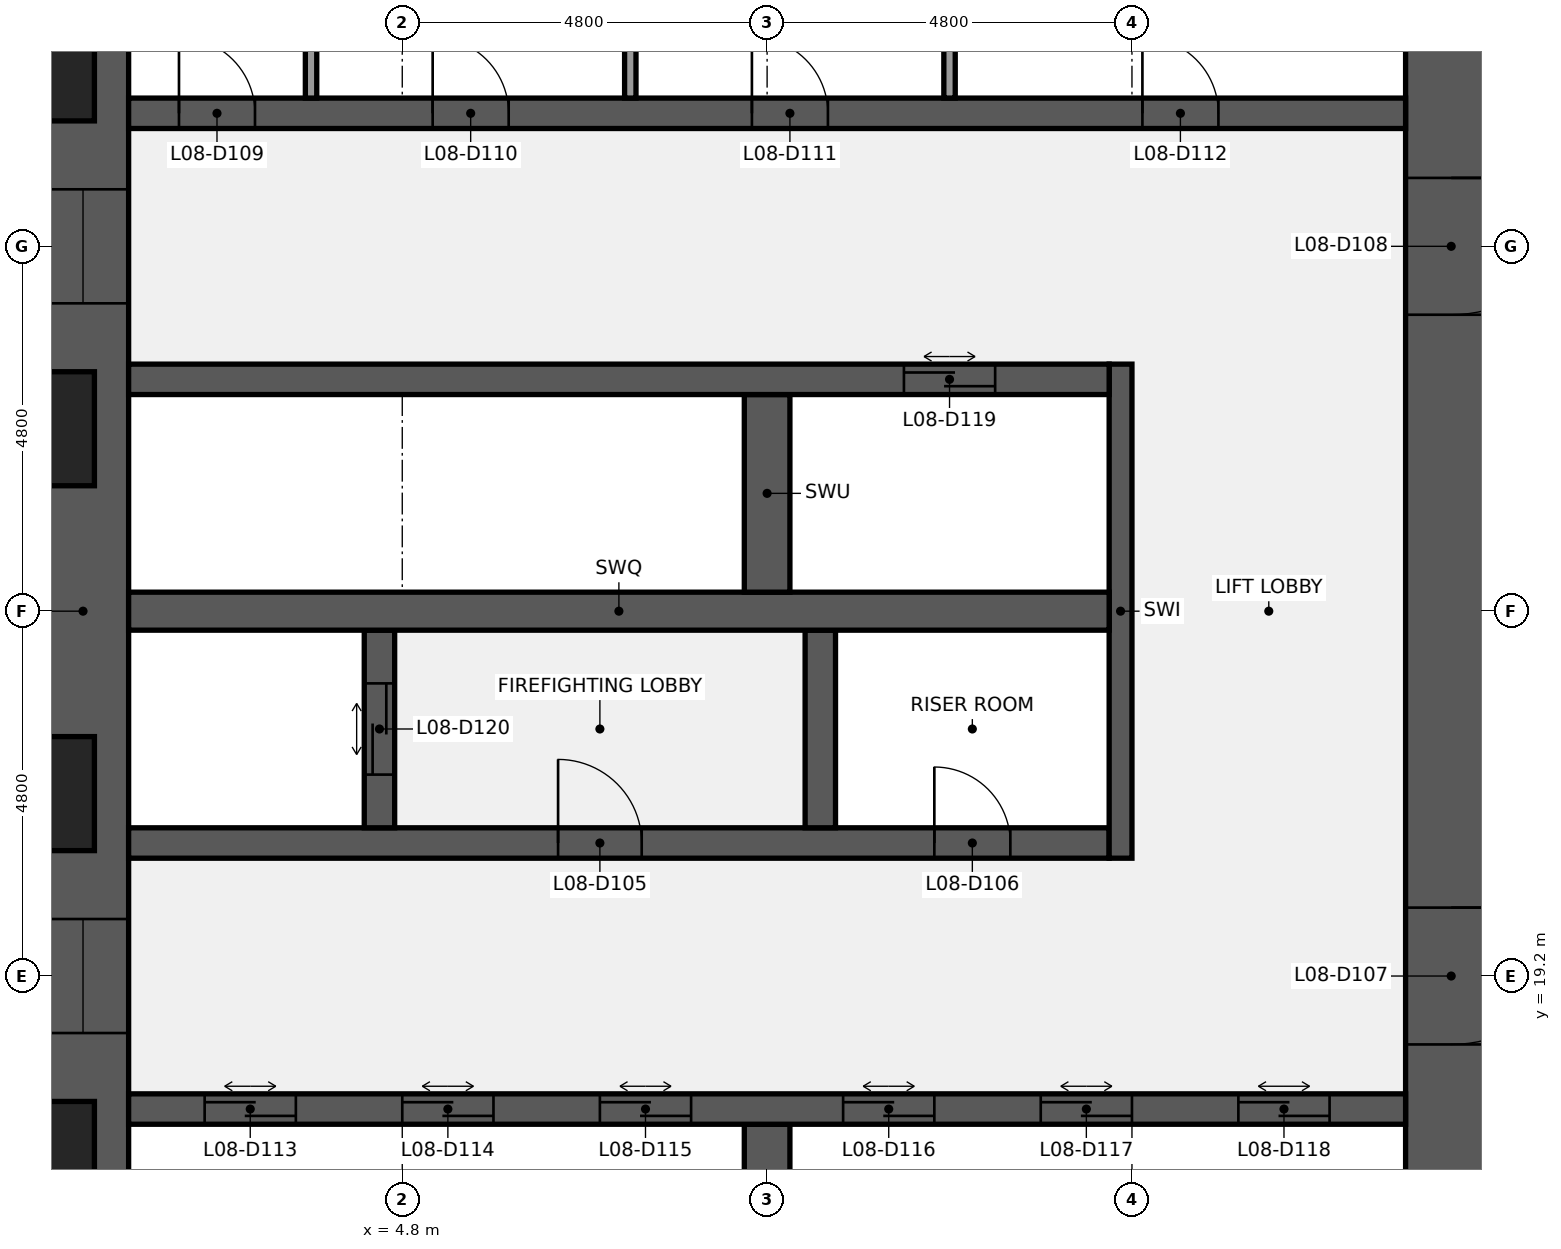
"""IFC4 building model, lengths in metres.
Left out: names, types, materials, properties, quantities, classifications, styles, units other than length and angle.
Written with IfcOpenShell. Run it as: python <this file> out.ifc"""

import sys

from ifc_helpers import new_model, si_unit, direction, frame, frame_2d, origin, place, context, subcontext, project, spatial, rectangle, extrude, element, fill, save


model = new_model("IFC4")
c1 = context("Model", 3, precision=1e-05, world=origin(), true_north=direction((0.0, 1.0)))
c2 = subcontext(c1, "Body", "Model", "MODEL_VIEW")
j1 = project(units=[si_unit("LENGTHUNIT", "METRE"), si_unit("PLANEANGLEUNIT", "RADIAN")], contexts=[c1])
p1 = place(None, origin())
s1 = spatial("IfcSite", under=j1, at=p1, CompositionType="ELEMENT")
p2 = place(p1, origin())
s2 = spatial("IfcBuilding", under=s1, at=p2, CompositionType="ELEMENT")
p3 = place(p2, frame((0.0, 0.0, 43.0)))
s3 = spatial("IfcBuildingStorey", under=s2, at=p3, CompositionType="ELEMENT", Elevation=43.0)
p4 = place(p3, frame((0.6, 9.6, 0.0), z_axis=(0.0, 0.0, 1.0), x_axis=(0.0, 1.0, 0.0)))
e1 = element("IfcWall", 1, at=p4, inside=s3, PredefinedType="SHEAR", context=c2, shape_type="SweptSolid", body=[
    extrude(rectangle(XDim=28.8, YDim=1.2, at=frame_2d((14.4, 0.0))), origin(), (0.0, 0.0, 1.0), 3.84),
])
p5 = place(p4, frame((8.85, 0.0, 0.9)))
e2 = element("IfcOpeningElement", 2, at=p5, cuts=e1, PredefinedType="OPENING", context=c2, shape_type="SweptSolid", body=[
    extrude(rectangle(XDim=1.5, YDim=1.5, at=frame_2d((0.75, 0.75))), frame((0.0, 0.61, 0.0), z_axis=(0.0, -1.0, 0.0), x_axis=(1.0, 0.0, 0.0)), (0.0, 0.0, 1.0), 1.22),
])
p6 = place(p4, frame((18.45, 0.0, 0.9)))
e3 = element("IfcOpeningElement", 3, at=p6, cuts=e1, PredefinedType="OPENING", context=c2, shape_type="SweptSolid", body=[
    extrude(rectangle(XDim=1.5, YDim=1.5, at=frame_2d((0.75, 0.75))), frame((0.0, 0.61, 0.0), z_axis=(0.0, -1.0, 0.0), x_axis=(1.0, 0.0, 0.0)), (0.0, 0.0, 1.0), 1.22),
])
p7 = place(p3, frame((18.6, 38.4, 0.0), z_axis=(0.0, 0.0, 1.0), x_axis=(0.0, -1.0, 0.0)))
e4 = element("IfcWall", 4, at=p7, inside=s3, PredefinedType="SHEAR", context=c2, shape_type="SweptSolid", body=[
    extrude(rectangle(XDim=28.8, YDim=1.2, at=frame_2d((14.4, 0.0))), origin(), (0.0, 0.0, 1.0), 3.84),
])
p8 = place(p7, frame((18.3, 0.0, 0.0)))
e5 = element("IfcOpeningElement", 5, at=p8, cuts=e4, PredefinedType="OPENING", context=c2, shape_type="SweptSolid", body=[
    extrude(rectangle(XDim=1.8, YDim=2.1, at=frame_2d((0.9, 1.05))), frame((0.0, 0.61, 0.0), z_axis=(0.0, -1.0, 0.0), x_axis=(1.0, 0.0, 0.0)), (0.0, 0.0, 1.0), 1.22),
])
p9 = place(p7, frame((8.7, 0.0, 0.0)))
e6 = element("IfcOpeningElement", 6, at=p9, cuts=e4, PredefinedType="OPENING", context=c2, shape_type="SweptSolid", body=[
    extrude(rectangle(XDim=1.8, YDim=2.1, at=frame_2d((0.9, 1.05))), frame((0.0, 0.61, 0.0), z_axis=(0.0, -1.0, 0.0), x_axis=(1.0, 0.0, 0.0)), (0.0, 0.0, 1.0), 1.22),
])
p10 = place(p3, frame((9.6, 14.65, 0.0), z_axis=(0.0, 0.0, 1.0), x_axis=(0.0, 1.0, 0.0)))
e7 = element("IfcWall", 7, at=p10, inside=s3, PredefinedType="SHEAR", context=c2, shape_type="SweptSolid", body=[
    extrude(rectangle(XDim=2.6, YDim=0.6, at=frame_2d((1.3, 0.0))), origin(), (0.0, 0.0, 1.0), 3.84),
])
p11 = place(p3, frame((1.2, 17.45, 0.0), z_axis=(0.0, 0.0, 1.0), x_axis=(1.0, 0.0, 0.0)))
e8 = element("IfcWall", 8, at=p11, inside=s3, PredefinedType="SHEAR", context=c2, shape_type="SweptSolid", body=[
    extrude(rectangle(XDim=16.8, YDim=0.4, at=frame_2d((8.4, 0.0))), origin(), (0.0, 0.0, 1.0), 3.84),
])
p12 = place(p11, frame((1.0, 0.0, 0.0)))
e9 = element("IfcOpeningElement", 9, at=p12, cuts=e8, PredefinedType="OPENING", context=c2, shape_type="SweptSolid", body=[
    extrude(rectangle(XDim=1.2, YDim=2.1, at=frame_2d((0.6, 1.05))), frame((0.0, 0.21, 0.0), z_axis=(0.0, -1.0, 0.0), x_axis=(1.0, 0.0, 0.0)), (0.0, 0.0, 1.0), 0.42),
])
p13 = place(p11, frame((3.6, 0.0, 0.0)))
e10 = element("IfcOpeningElement", 10, at=p13, cuts=e8, PredefinedType="OPENING", context=c2, shape_type="SweptSolid", body=[
    extrude(rectangle(XDim=1.2, YDim=2.1, at=frame_2d((0.6, 1.05))), frame((0.0, 0.21, 0.0), z_axis=(0.0, -1.0, 0.0), x_axis=(1.0, 0.0, 0.0)), (0.0, 0.0, 1.0), 0.42),
])
p14 = place(p11, frame((6.2, 0.0, 0.0)))
e11 = element("IfcOpeningElement", 11, at=p14, cuts=e8, PredefinedType="OPENING", context=c2, shape_type="SweptSolid", body=[
    extrude(rectangle(XDim=1.2, YDim=2.1, at=frame_2d((0.6, 1.05))), frame((0.0, 0.21, 0.0), z_axis=(0.0, -1.0, 0.0), x_axis=(1.0, 0.0, 0.0)), (0.0, 0.0, 1.0), 0.42),
])
p15 = place(p11, frame((9.4, 0.0, 0.0)))
e12 = element("IfcOpeningElement", 12, at=p15, cuts=e8, PredefinedType="OPENING", context=c2, shape_type="SweptSolid", body=[
    extrude(rectangle(XDim=1.2, YDim=2.1, at=frame_2d((0.6, 1.05))), frame((0.0, 0.21, 0.0), z_axis=(0.0, -1.0, 0.0), x_axis=(1.0, 0.0, 0.0)), (0.0, 0.0, 1.0), 0.42),
])
p16 = place(p11, frame((12.0, 0.0, 0.0)))
e13 = element("IfcOpeningElement", 13, at=p16, cuts=e8, PredefinedType="OPENING", context=c2, shape_type="SweptSolid", body=[
    extrude(rectangle(XDim=1.2, YDim=2.1, at=frame_2d((0.6, 1.05))), frame((0.0, 0.21, 0.0), z_axis=(0.0, -1.0, 0.0), x_axis=(1.0, 0.0, 0.0)), (0.0, 0.0, 1.0), 0.42),
])
p17 = place(p11, frame((14.6, 0.0, 0.0)))
e14 = element("IfcOpeningElement", 14, at=p17, cuts=e8, PredefinedType="OPENING", context=c2, shape_type="SweptSolid", body=[
    extrude(rectangle(XDim=1.2, YDim=2.1, at=frame_2d((0.6, 1.05))), frame((0.0, 0.21, 0.0), z_axis=(0.0, -1.0, 0.0), x_axis=(1.0, 0.0, 0.0)), (0.0, 0.0, 1.0), 0.42),
])
p18 = place(p3, frame((1.2, 20.95, 0.0), z_axis=(0.0, 0.0, 1.0), x_axis=(1.0, 0.0, 0.0)))
e15 = element("IfcWall", 15, at=p18, inside=s3, PredefinedType="SHEAR", context=c2, shape_type="SweptSolid", body=[
    extrude(rectangle(XDim=12.9, YDim=0.4, at=frame_2d((6.45, 0.0))), origin(), (0.0, 0.0, 1.0), 3.84),
])
p19 = place(p18, frame((5.65, 0.0, 0.0)))
e16 = element("IfcOpeningElement", 16, at=p19, cuts=e15, PredefinedType="OPENING", context=c2, shape_type="SweptSolid", body=[
    extrude(rectangle(XDim=1.1, YDim=2.1, at=frame_2d((0.55, 1.05))), frame((0.0, 0.21, 0.0), z_axis=(0.0, -1.0, 0.0), x_axis=(1.0, 0.0, 0.0)), (0.0, 0.0, 1.0), 0.42),
])
p20 = place(p18, frame((10.6, 0.0, 0.0)))
e17 = element("IfcOpeningElement", 17, at=p20, cuts=e15, PredefinedType="OPENING", context=c2, shape_type="SweptSolid", body=[
    extrude(rectangle(XDim=1.0, YDim=2.1, at=frame_2d((0.5, 1.05))), frame((0.0, 0.21, 0.0), z_axis=(0.0, -1.0, 0.0), x_axis=(1.0, 0.0, 0.0)), (0.0, 0.0, 1.0), 0.42),
])
p21 = place(p3, frame((14.25, 20.75, 0.0), z_axis=(0.0, 0.0, 1.0), x_axis=(0.0, 1.0, 0.0)))
e18 = element("IfcWall", 18, at=p21, inside=s3, PredefinedType="SHEAR", context=c2, shape_type="SweptSolid", body=[
    extrude(rectangle(XDim=6.5, YDim=0.3, at=frame_2d((3.25, 0.0))), origin(), (0.0, 0.0, 1.0), 3.84),
])
p22 = place(p3, frame((4.5, 21.15, 0.0), z_axis=(0.0, 0.0, 1.0), x_axis=(0.0, 1.0, 0.0)))
e19 = element("IfcWall", 19, at=p22, inside=s3, PredefinedType="SHEAR", context=c2, shape_type="SweptSolid", body=[
    extrude(rectangle(XDim=2.6, YDim=0.4, at=frame_2d((1.3, 0.0))), origin(), (0.0, 0.0, 1.0), 3.84),
])
p23 = place(p22, frame((0.7, 0.0, 0.0)))
e20 = element("IfcOpeningElement", 20, at=p23, cuts=e19, PredefinedType="OPENING", context=c2, shape_type="SweptSolid", body=[
    extrude(rectangle(XDim=1.2, YDim=2.1, at=frame_2d((0.6, 1.05))), frame((0.0, 0.21, 0.0), z_axis=(0.0, -1.0, 0.0), x_axis=(1.0, 0.0, 0.0)), (0.0, 0.0, 1.0), 0.42),
])
p24 = place(p3, frame((10.3, 21.15, 0.0), z_axis=(0.0, 0.0, 1.0), x_axis=(0.0, 1.0, 0.0)))
e21 = element("IfcWall", 21, at=p24, inside=s3, PredefinedType="SHEAR", context=c2, shape_type="SweptSolid", body=[
    extrude(rectangle(XDim=2.6, YDim=0.4, at=frame_2d((1.3, 0.0))), origin(), (0.0, 0.0, 1.0), 3.84),
])
p25 = place(p3, frame((1.2, 24.0, 0.0), z_axis=(0.0, 0.0, 1.0), x_axis=(1.0, 0.0, 0.0)))
e22 = element("IfcWall", 22, at=p25, inside=s3, PredefinedType="SHEAR", context=c2, shape_type="SweptSolid", body=[
    extrude(rectangle(XDim=12.9, YDim=0.5, at=frame_2d((6.45, 0.0))), origin(), (0.0, 0.0, 1.0), 3.84),
])
p26 = place(p3, frame((9.6, 24.25, 0.0), z_axis=(0.0, 0.0, 1.0), x_axis=(0.0, 1.0, 0.0)))
e23 = element("IfcWall", 23, at=p26, inside=s3, PredefinedType="SHEAR", context=c2, shape_type="SweptSolid", body=[
    extrude(rectangle(XDim=2.6, YDim=0.6, at=frame_2d((1.3, 0.0))), origin(), (0.0, 0.0, 1.0), 3.84),
])
p27 = place(p3, frame((1.2, 27.05, 0.0), z_axis=(0.0, 0.0, 1.0), x_axis=(1.0, 0.0, 0.0)))
e24 = element("IfcWall", 24, at=p27, inside=s3, PredefinedType="SHEAR", context=c2, shape_type="SweptSolid", body=[
    extrude(rectangle(XDim=12.9, YDim=0.4, at=frame_2d((6.45, 0.0))), origin(), (0.0, 0.0, 1.0), 3.84),
])
p28 = place(p27, frame((10.2, 0.0, 0.0)))
e25 = element("IfcOpeningElement", 25, at=p28, cuts=e24, PredefinedType="OPENING", context=c2, shape_type="SweptSolid", body=[
    extrude(rectangle(XDim=1.2, YDim=2.1, at=frame_2d((0.6, 1.05))), frame((0.0, 0.21, 0.0), z_axis=(0.0, -1.0, 0.0), x_axis=(1.0, 0.0, 0.0)), (0.0, 0.0, 1.0), 0.42),
])
p29 = place(p3, frame((1.2, 30.55, 0.0), z_axis=(0.0, 0.0, 1.0), x_axis=(1.0, 0.0, 0.0)))
e26 = element("IfcWall", 26, at=p29, inside=s3, PredefinedType="SHEAR", context=c2, shape_type="SweptSolid", body=[
    extrude(rectangle(XDim=16.8, YDim=0.4, at=frame_2d((8.4, 0.0))), origin(), (0.0, 0.0, 1.0), 3.84),
])
p30 = place(p29, frame((0.663, 0.0, 0.0)))
e27 = element("IfcOpeningElement", 27, at=p30, cuts=e26, PredefinedType="OPENING", context=c2, shape_type="SweptSolid", body=[
    extrude(rectangle(XDim=1.0, YDim=2.1, at=frame_2d((0.5, 1.05))), frame((0.0, 0.21, 0.0), z_axis=(0.0, -1.0, 0.0), x_axis=(1.0, 0.0, 0.0)), (0.0, 0.0, 1.0), 0.42),
])
p31 = place(p29, frame((4.0, 0.0, 0.0)))
e28 = element("IfcOpeningElement", 28, at=p31, cuts=e26, PredefinedType="OPENING", context=c2, shape_type="SweptSolid", body=[
    extrude(rectangle(XDim=1.0, YDim=2.1, at=frame_2d((0.5, 1.05))), frame((0.0, 0.21, 0.0), z_axis=(0.0, -1.0, 0.0), x_axis=(1.0, 0.0, 0.0)), (0.0, 0.0, 1.0), 0.42),
])
p32 = place(p29, frame((8.2, 0.0, 0.0)))
e29 = element("IfcOpeningElement", 29, at=p32, cuts=e26, PredefinedType="OPENING", context=c2, shape_type="SweptSolid", body=[
    extrude(rectangle(XDim=1.0, YDim=2.1, at=frame_2d((0.5, 1.05))), frame((0.0, 0.21, 0.0), z_axis=(0.0, -1.0, 0.0), x_axis=(1.0, 0.0, 0.0)), (0.0, 0.0, 1.0), 0.42),
])
p33 = place(p29, frame((13.337, 0.0, 0.0)))
e30 = element("IfcOpeningElement", 30, at=p33, cuts=e26, PredefinedType="OPENING", context=c2, shape_type="SweptSolid", body=[
    extrude(rectangle(XDim=1.0, YDim=2.1, at=frame_2d((0.5, 1.05))), frame((0.0, 0.21, 0.0), z_axis=(0.0, -1.0, 0.0), x_axis=(1.0, 0.0, 0.0)), (0.0, 0.0, 1.0), 0.42),
])
for number, where, z_axis, x_axis in (
    (31, (3.6, 30.75, 0.0), (0.0, 0.0, 1.0), (0.0, 1.0, 0.0)),
    (32, (7.8, 30.75, 0.0), (0.0, 0.0, 1.0), (0.0, 1.0, 0.0)),
    (33, (12.0, 30.75, 0.0), (0.0, 0.0, 1.0), (0.0, 1.0, 0.0)),
):
    element("IfcWall", number, at=place(p3, frame(where, z_axis=z_axis, x_axis=x_axis)), inside=s3, PredefinedType="PARTITIONING", context=c2, shape_type="SweptSolid", body=[
        extrude(rectangle(XDim=2.6, YDim=0.15, at=frame_2d((1.3, 0.0))), origin(), (0.0, 0.0, 1.0), 3.84),
    ])
p34 = place(p19, origin())
e34 = element("IfcDoor", 34, at=p34, inside=s3, OperationType="SINGLE_SWING_LEFT", PredefinedType="DOOR", context=c2, shape_type="SweptSolid", body=[
    extrude(rectangle(XDim=1.1, YDim=2.1, at=frame_2d((0.55, 1.05))), frame((0.0, 0.025, 0.0), z_axis=(0.0, -1.0, 0.0), x_axis=(1.0, 0.0, 0.0)), (0.0, 0.0, 1.0), 0.05),
])
fill(e16, e34)
p35 = place(p20, origin())
e35 = element("IfcDoor", 35, at=p35, inside=s3, OperationType="SINGLE_SWING_LEFT", PredefinedType="DOOR", context=c2, shape_type="SweptSolid", body=[
    extrude(rectangle(XDim=1.0, YDim=2.1, at=frame_2d((0.5, 1.05))), frame((0.0, 0.025, 0.0), z_axis=(0.0, -1.0, 0.0), x_axis=(1.0, 0.0, 0.0)), (0.0, 0.0, 1.0), 0.05),
])
fill(e17, e35)
p36 = place(p8, origin())
e36 = element("IfcDoor", 36, at=p36, inside=s3, OperationType="DOUBLE_DOOR_SINGLE_SWING", PredefinedType="DOOR", context=c2, shape_type="SweptSolid", body=[
    extrude(rectangle(XDim=1.8, YDim=2.1, at=frame_2d((0.9, 1.05))), frame((0.0, 0.025, 0.0), z_axis=(0.0, -1.0, 0.0), x_axis=(1.0, 0.0, 0.0)), (0.0, 0.0, 1.0), 0.05),
])
fill(e5, e36)
p37 = place(p9, origin())
e37 = element("IfcDoor", 37, at=p37, inside=s3, OperationType="DOUBLE_DOOR_SINGLE_SWING", PredefinedType="DOOR", context=c2, shape_type="SweptSolid", body=[
    extrude(rectangle(XDim=1.8, YDim=2.1, at=frame_2d((0.9, 1.05))), frame((0.0, 0.025, 0.0), z_axis=(0.0, -1.0, 0.0), x_axis=(1.0, 0.0, 0.0)), (0.0, 0.0, 1.0), 0.05),
])
fill(e6, e37)
p38 = place(p30, origin())
e38 = element("IfcDoor", 38, at=p38, inside=s3, OperationType="SINGLE_SWING_LEFT", PredefinedType="DOOR", context=c2, shape_type="SweptSolid", body=[
    extrude(rectangle(XDim=1.0, YDim=2.1, at=frame_2d((0.5, 1.05))), frame((0.0, 0.025, 0.0), z_axis=(0.0, -1.0, 0.0), x_axis=(1.0, 0.0, 0.0)), (0.0, 0.0, 1.0), 0.05),
])
fill(e27, e38)
p39 = place(p31, origin())
e39 = element("IfcDoor", 39, at=p39, inside=s3, OperationType="SINGLE_SWING_LEFT", PredefinedType="DOOR", context=c2, shape_type="SweptSolid", body=[
    extrude(rectangle(XDim=1.0, YDim=2.1, at=frame_2d((0.5, 1.05))), frame((0.0, 0.025, 0.0), z_axis=(0.0, -1.0, 0.0), x_axis=(1.0, 0.0, 0.0)), (0.0, 0.0, 1.0), 0.05),
])
fill(e28, e39)
p40 = place(p32, origin())
e40 = element("IfcDoor", 40, at=p40, inside=s3, OperationType="SINGLE_SWING_LEFT", PredefinedType="DOOR", context=c2, shape_type="SweptSolid", body=[
    extrude(rectangle(XDim=1.0, YDim=2.1, at=frame_2d((0.5, 1.05))), frame((0.0, 0.025, 0.0), z_axis=(0.0, -1.0, 0.0), x_axis=(1.0, 0.0, 0.0)), (0.0, 0.0, 1.0), 0.05),
])
fill(e29, e40)
p41 = place(p33, origin())
e41 = element("IfcDoor", 41, at=p41, inside=s3, OperationType="SINGLE_SWING_LEFT", PredefinedType="DOOR", context=c2, shape_type="SweptSolid", body=[
    extrude(rectangle(XDim=1.0, YDim=2.1, at=frame_2d((0.5, 1.05))), frame((0.0, 0.025, 0.0), z_axis=(0.0, -1.0, 0.0), x_axis=(1.0, 0.0, 0.0)), (0.0, 0.0, 1.0), 0.05),
])
fill(e30, e41)
p42 = place(p12, origin())
e42 = element("IfcDoor", 42, at=p42, inside=s3, OperationType="DOUBLE_DOOR_SLIDING", PredefinedType="DOOR", context=c2, shape_type="SweptSolid", body=[
    extrude(rectangle(XDim=1.2, YDim=2.1, at=frame_2d((0.6, 1.05))), frame((0.0, 0.025, 0.0), z_axis=(0.0, -1.0, 0.0), x_axis=(1.0, 0.0, 0.0)), (0.0, 0.0, 1.0), 0.05),
])
fill(e9, e42)
p43 = place(p13, origin())
e43 = element("IfcDoor", 43, at=p43, inside=s3, OperationType="DOUBLE_DOOR_SLIDING", PredefinedType="DOOR", context=c2, shape_type="SweptSolid", body=[
    extrude(rectangle(XDim=1.2, YDim=2.1, at=frame_2d((0.6, 1.05))), frame((0.0, 0.025, 0.0), z_axis=(0.0, -1.0, 0.0), x_axis=(1.0, 0.0, 0.0)), (0.0, 0.0, 1.0), 0.05),
])
fill(e10, e43)
p44 = place(p14, origin())
e44 = element("IfcDoor", 44, at=p44, inside=s3, OperationType="DOUBLE_DOOR_SLIDING", PredefinedType="DOOR", context=c2, shape_type="SweptSolid", body=[
    extrude(rectangle(XDim=1.2, YDim=2.1, at=frame_2d((0.6, 1.05))), frame((0.0, 0.025, 0.0), z_axis=(0.0, -1.0, 0.0), x_axis=(1.0, 0.0, 0.0)), (0.0, 0.0, 1.0), 0.05),
])
fill(e11, e44)
p45 = place(p15, origin())
e45 = element("IfcDoor", 45, at=p45, inside=s3, OperationType="DOUBLE_DOOR_SLIDING", PredefinedType="DOOR", context=c2, shape_type="SweptSolid", body=[
    extrude(rectangle(XDim=1.2, YDim=2.1, at=frame_2d((0.6, 1.05))), frame((0.0, 0.025, 0.0), z_axis=(0.0, -1.0, 0.0), x_axis=(1.0, 0.0, 0.0)), (0.0, 0.0, 1.0), 0.05),
])
fill(e12, e45)
p46 = place(p16, origin())
e46 = element("IfcDoor", 46, at=p46, inside=s3, OperationType="DOUBLE_DOOR_SLIDING", PredefinedType="DOOR", context=c2, shape_type="SweptSolid", body=[
    extrude(rectangle(XDim=1.2, YDim=2.1, at=frame_2d((0.6, 1.05))), frame((0.0, 0.025, 0.0), z_axis=(0.0, -1.0, 0.0), x_axis=(1.0, 0.0, 0.0)), (0.0, 0.0, 1.0), 0.05),
])
fill(e13, e46)
p47 = place(p17, origin())
e47 = element("IfcDoor", 47, at=p47, inside=s3, OperationType="DOUBLE_DOOR_SLIDING", PredefinedType="DOOR", context=c2, shape_type="SweptSolid", body=[
    extrude(rectangle(XDim=1.2, YDim=2.1, at=frame_2d((0.6, 1.05))), frame((0.0, 0.025, 0.0), z_axis=(0.0, -1.0, 0.0), x_axis=(1.0, 0.0, 0.0)), (0.0, 0.0, 1.0), 0.05),
])
fill(e14, e47)
p48 = place(p28, origin())
e48 = element("IfcDoor", 48, at=p48, inside=s3, OperationType="DOUBLE_DOOR_SLIDING", PredefinedType="DOOR", context=c2, shape_type="SweptSolid", body=[
    extrude(rectangle(XDim=1.2, YDim=2.1, at=frame_2d((0.6, 1.05))), frame((0.0, 0.025, 0.0), z_axis=(0.0, -1.0, 0.0), x_axis=(1.0, 0.0, 0.0)), (0.0, 0.0, 1.0), 0.05),
])
fill(e25, e48)
p49 = place(p23, origin())
e49 = element("IfcDoor", 49, at=p49, inside=s3, OperationType="DOUBLE_DOOR_SLIDING", PredefinedType="DOOR", context=c2, shape_type="SweptSolid", body=[
    extrude(rectangle(XDim=1.2, YDim=2.1, at=frame_2d((0.6, 1.05))), frame((0.0, 0.025, 0.0), z_axis=(0.0, -1.0, 0.0), x_axis=(1.0, 0.0, 0.0)), (0.0, 0.0, 1.0), 0.05),
])
fill(e20, e49)
p50 = place(p5, origin())
e50 = element("IfcWindow", 50, at=p50, inside=s3, PartitioningType="SINGLE_PANEL", PredefinedType="WINDOW", context=c2, shape_type="SweptSolid", body=[
    extrude(rectangle(XDim=1.5, YDim=1.5, at=frame_2d((0.75, 0.75))), frame((0.0, 0.03, 0.0), z_axis=(0.0, -1.0, 0.0), x_axis=(1.0, 0.0, 0.0)), (0.0, 0.0, 1.0), 0.06),
])
fill(e2, e50)
p51 = place(p6, origin())
e51 = element("IfcWindow", 51, at=p51, inside=s3, PartitioningType="SINGLE_PANEL", PredefinedType="WINDOW", context=c2, shape_type="SweptSolid", body=[
    extrude(rectangle(XDim=1.5, YDim=1.5, at=frame_2d((0.75, 0.75))), frame((0.0, 0.03, 0.0), z_axis=(0.0, -1.0, 0.0), x_axis=(1.0, 0.0, 0.0)), (0.0, 0.0, 1.0), 0.06),
])
fill(e3, e51)
save(model, sys.argv[1])
